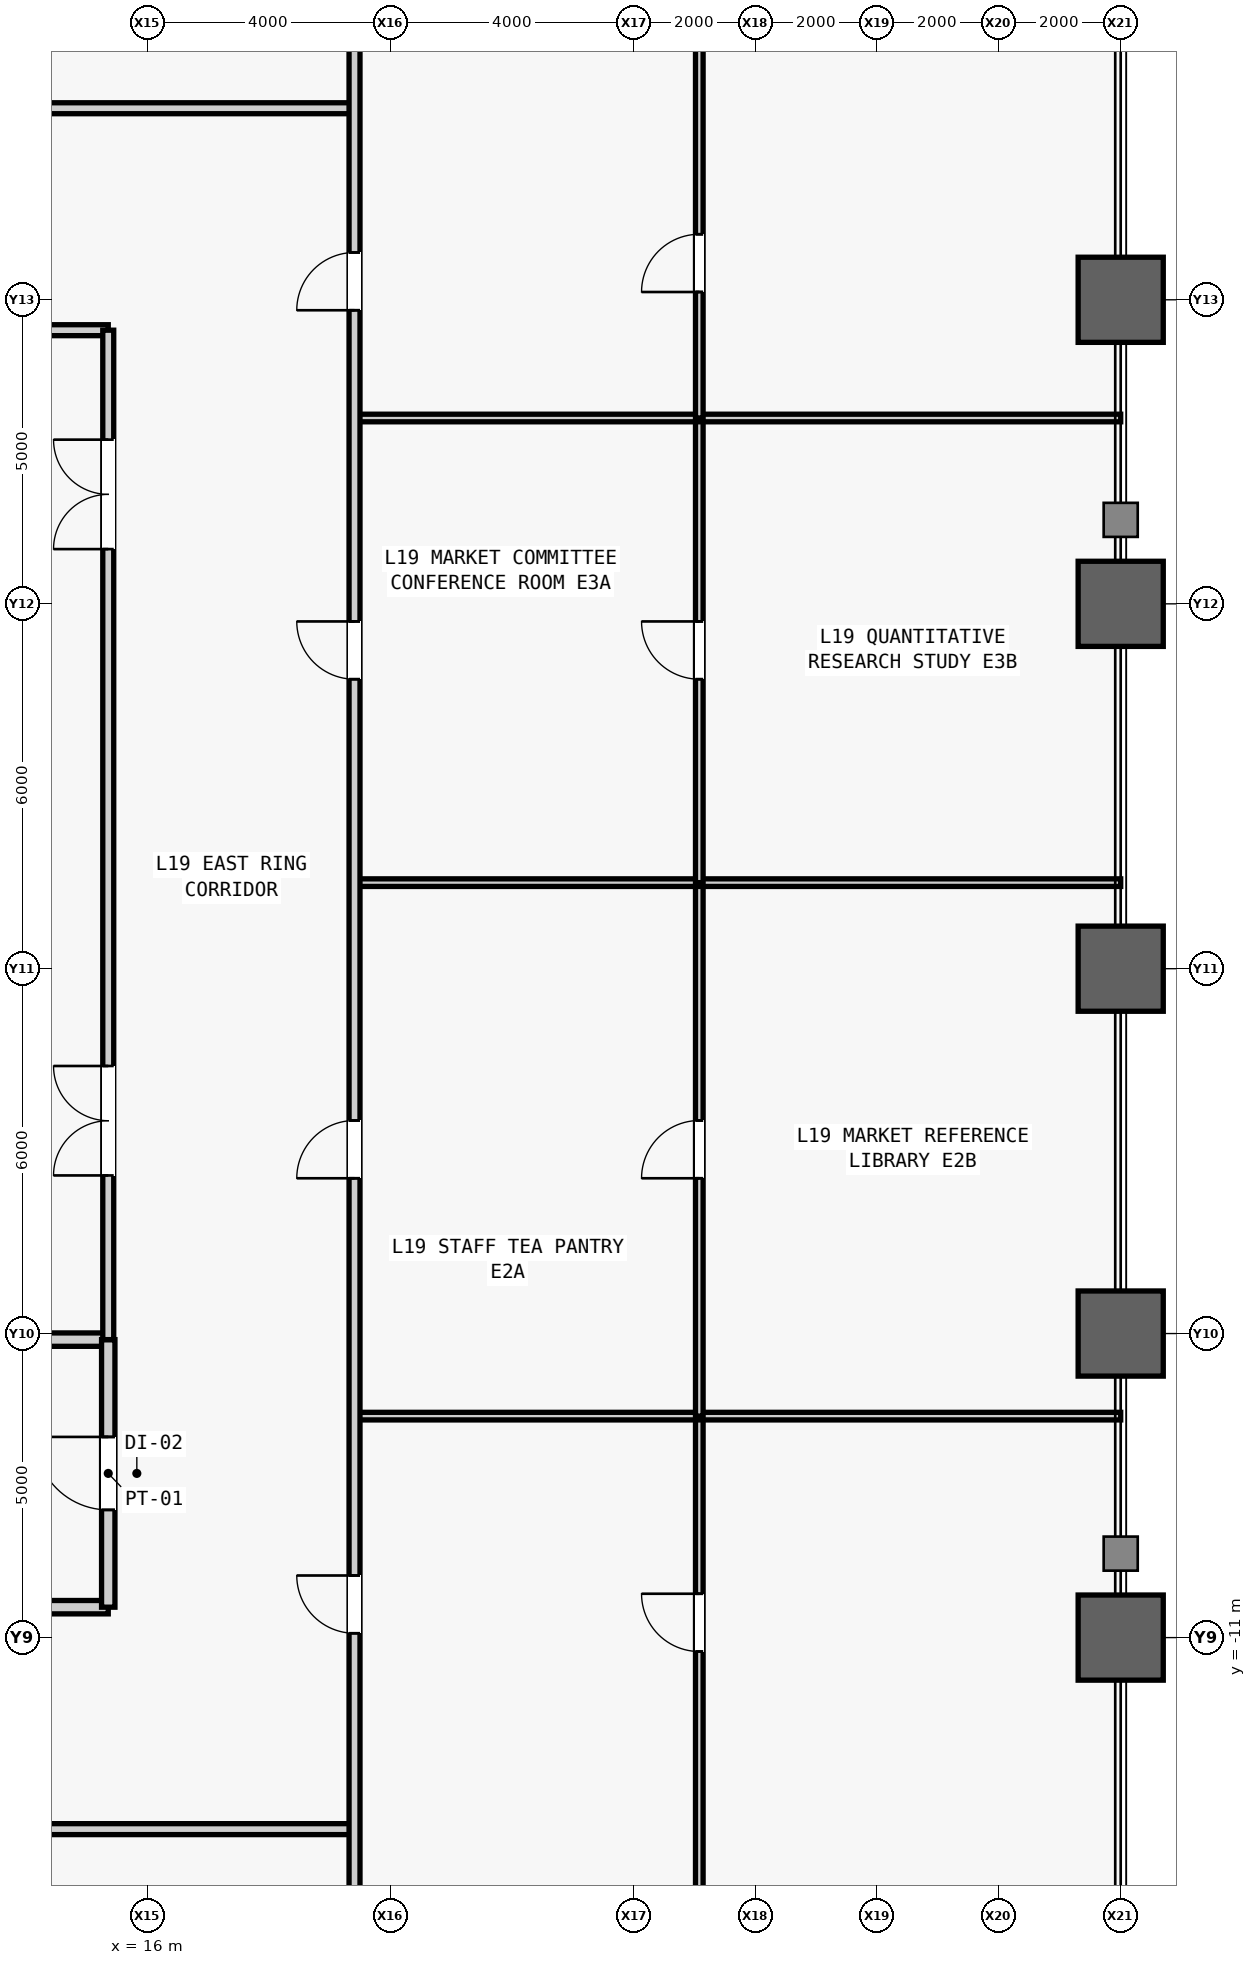
"""IFC4 building model, lengths in metres.
Left out: names, types, materials, properties, quantities, classifications, styles, units other than length and angle.
Written with IfcOpenShell. Run it as: python <this file> out.ifc"""

import sys

from ifc_helpers import new_model, si_unit, direction, frame, frame_2d, origin, origin_2d, place, context, subcontext, project, spatial, rectangle, hollow_rectangle, extrude, source, transform, mapped, element, fill, save


model = new_model("IFC4")
c1 = context("Model", 3, precision=1e-05, world=origin(), true_north=direction((0.0, 1.0)))
c2 = subcontext(c1, "Body", "Model", "MODEL_VIEW")
j1 = project(units=[si_unit("LENGTHUNIT", "METRE"), si_unit("PLANEANGLEUNIT", "RADIAN")], contexts=[c1])
p1 = place(None, origin())
s1 = spatial("IfcSite", under=j1, at=p1, CompositionType="ELEMENT")
p2 = place(p1, origin())
s2 = spatial("IfcBuilding", under=s1, at=p2, CompositionType="ELEMENT")
p3 = place(p2, frame((0.0, 0.0, 87.2)))
s3 = spatial("IfcBuildingStorey", under=s2, at=p3, CompositionType="ELEMENT", Elevation=87.2)
m1 = source(origin(), c2, "Body", "SweptSolid", [
    extrude(hollow_rectangle(XDim=1.4, YDim=1.4, WallThickness=0.075, at=origin_2d()), origin(), (0.0, 0.0, 1.0), 4.2),
])
for number, where, z_axis, x_axis in (
    (1, (32.0, -11.0, 0.0), (0.0, 0.0, 1.0), (1.0, 0.0, 0.0)),
    (2, (32.0, -6.0, 0.0), (0.0, 0.0, 1.0), (1.0, 0.0, 0.0)),
    (3, (32.0, 0.0, 0.0), (0.0, 0.0, 1.0), (1.0, 0.0, 0.0)),
    (4, (32.0, 6.0, 0.0), (0.0, 0.0, 1.0), (1.0, 0.0, 0.0)),
    (5, (32.0, 11.0, 0.0), (0.0, 0.0, 1.0), (1.0, 0.0, 0.0)),
):
    element("IfcColumn", number, at=place(p3, frame(where, z_axis=z_axis, x_axis=x_axis)), inside=s3, PredefinedType="COLUMN", context=c2, shape_type="MappedRepresentation", body=[
        mapped(m1, transform((0.0, 0.0, 0.0), scale=1.0)),
    ])
m2 = source(origin(), c2, "Body", "SweptSolid", [
    extrude(rectangle(XDim=4.05, YDim=0.22, at=frame_2d((2.025, 0.0))), origin(), (0.0, 0.0, 1.0), 3.94),
])
p4 = place(p3, frame((11.3, -10.5, 0.0), z_axis=(0.0, 0.0, 1.0), x_axis=(1.0, 0.0, 0.0)))
e6 = element("IfcWall", 6, at=p4, inside=s3, PredefinedType="PARTITIONING", context=c2, shape_type="MappedRepresentation", body=[
    mapped(m2, transform((0.0, 0.0, 0.0), scale=1.0)),
])
m3 = source(origin(), c2, "Body", "SweptSolid", [
    extrude(rectangle(XDim=4.05, YDim=0.22, at=frame_2d((2.025, 0.0))), origin(), (0.0, 0.0, 1.0), 2.54),
])
p5 = place(p3, frame((11.3, -6.1, 0.0), z_axis=(0.0, 0.0, 1.0), x_axis=(1.0, 0.0, 0.0)))
e7 = element("IfcWall", 7, at=p5, inside=s3, PredefinedType="PARTITIONING", context=c2, shape_type="MappedRepresentation", body=[
    mapped(m3, transform((0.0, 0.0, 0.0), scale=1.0)),
])
m4 = source(origin(), c2, "Body", "SweptSolid", [
    extrude(rectangle(XDim=4.4, YDim=0.22, at=frame_2d((2.2, 0.0))), origin(), (0.0, 0.0, 1.0), 3.94),
])
p6 = place(p3, frame((15.35, -10.5, 0.0), z_axis=(0.0, 0.0, 1.0), x_axis=(0.0, 1.0, 0.0)))
e8 = element("IfcWall", 8, at=p6, inside=s3, PredefinedType="PARTITIONING", context=c2, shape_type="MappedRepresentation", body=[
    mapped(m4, transform((0.0, 0.0, 0.0), scale=1.0)),
])
m5 = source(origin(), c2, "Body", "SweptSolid", [
    extrude(rectangle(XDim=1.2, YDim=2.2, at=frame_2d((0.6, 1.1))), frame((0.0, 0.12, 0.0), z_axis=(0.0, -1.0, 0.0), x_axis=(1.0, 0.0, 0.0)), (0.0, 0.0, 1.0), 0.24),
])
p7 = place(p6, frame((1.6, 0.0, 0.0)))
e9 = element("IfcOpeningElement", 9, at=p7, cuts=e8, PredefinedType="OPENING", context=c2, shape_type="MappedRepresentation", body=[
    mapped(m5, transform((0.0, 0.0, 0.0), scale=1.0)),
])
m6 = source(origin(), c2, "Body", "SweptSolid", [
    extrude(rectangle(XDim=4.05, YDim=0.18, at=frame_2d((2.025, 0.0))), origin(), (0.0, 0.0, 1.0), 3.94),
])
p8 = place(p3, frame((11.3, 10.5, 0.0), z_axis=(0.0, 0.0, 1.0), x_axis=(1.0, 0.0, 0.0)))
e10 = element("IfcWall", 10, at=p8, inside=s3, PredefinedType="PARTITIONING", context=c2, shape_type="MappedRepresentation", body=[
    mapped(m6, transform((0.0, 0.0, 0.0), scale=1.0)),
])
m7 = source(origin(), c2, "Body", "SweptSolid", [
    extrude(rectangle(XDim=16.6, YDim=0.18, at=frame_2d((8.3, 0.0))), origin(), (0.0, 0.0, 1.0), 3.94),
])
p9 = place(p3, frame((15.35, -6.1, 0.0), z_axis=(0.0, 0.0, 1.0), x_axis=(0.0, 1.0, 0.0)))
e11 = element("IfcWall", 11, at=p9, inside=s3, PredefinedType="PARTITIONING", context=c2, shape_type="MappedRepresentation", body=[
    mapped(m7, transform((0.0, 0.0, 0.0), scale=1.0)),
])
m8 = source(origin(), c2, "Body", "SweptSolid", [
    extrude(rectangle(XDim=1.8, YDim=2.25, at=frame_2d((0.9, 1.125))), frame((0.0, 0.1, 0.0), z_axis=(0.0, -1.0, 0.0), x_axis=(1.0, 0.0, 0.0)), (0.0, 0.0, 1.0), 0.2),
])
p10 = place(p9, frame((2.7, 0.0, 0.0)))
e12 = element("IfcOpeningElement", 12, at=p10, cuts=e11, PredefinedType="OPENING", context=c2, shape_type="MappedRepresentation", body=[
    mapped(m8, transform((0.0, 0.0, 0.0), scale=1.0)),
])
p11 = place(p9, frame((13.0, 0.0, 0.0)))
e13 = element("IfcOpeningElement", 13, at=p11, cuts=e11, PredefinedType="OPENING", context=c2, shape_type="MappedRepresentation", body=[
    mapped(m8, transform((0.0, 0.0, 0.0), scale=1.0)),
])
m9 = source(origin(), c2, "Body", "SweptSolid", [
    extrude(rectangle(XDim=37.95, YDim=0.18, at=frame_2d((18.975, 0.0))), origin(), (0.0, 0.0, 1.0), 3.94),
])
p12 = place(p3, frame((-18.55, -14.15, 0.0), z_axis=(0.0, 0.0, 1.0), x_axis=(1.0, 0.0, 0.0)))
e14 = element("IfcWall", 14, at=p12, inside=s3, PredefinedType="PARTITIONING", context=c2, shape_type="MappedRepresentation", body=[
    mapped(m9, transform((0.0, 0.0, 0.0), scale=1.0)),
])
m10 = source(origin(), c2, "Body", "SweptSolid", [
    extrude(rectangle(XDim=1.05, YDim=2.2, at=frame_2d((0.525, 1.1))), frame((0.0, 0.1, 0.0), z_axis=(0.0, -1.0, 0.0), x_axis=(1.0, 0.0, 0.0)), (0.0, 0.0, 1.0), 0.2),
])
p13 = place(p12, frame((4.966, 0.0, 0.0)))
e15 = element("IfcOpeningElement", 15, at=p13, cuts=e14, PredefinedType="OPENING", context=c2, shape_type="MappedRepresentation", body=[
    mapped(m10, transform((0.0, 0.0, 0.0), scale=1.0)),
])
p14 = place(p12, frame((10.291, 0.0, 0.0)))
e16 = element("IfcOpeningElement", 16, at=p14, cuts=e14, PredefinedType="OPENING", context=c2, shape_type="MappedRepresentation", body=[
    mapped(m10, transform((0.0, 0.0, 0.0), scale=1.0)),
])
p15 = place(p12, frame((18.64, 0.0, 0.0)))
e17 = element("IfcOpeningElement", 17, at=p15, cuts=e14, PredefinedType="OPENING", context=c2, shape_type="MappedRepresentation", body=[
    mapped(m10, transform((0.0, 0.0, 0.0), scale=1.0)),
])
p16 = place(p12, frame((27.178, 0.0, 0.0)))
e18 = element("IfcOpeningElement", 18, at=p16, cuts=e14, PredefinedType="OPENING", context=c2, shape_type="MappedRepresentation", body=[
    mapped(m10, transform((0.0, 0.0, 0.0), scale=1.0)),
])
p17 = place(p3, frame((-18.55, 14.15, 0.0), z_axis=(0.0, 0.0, 1.0), x_axis=(1.0, 0.0, 0.0)))
e19 = element("IfcWall", 19, at=p17, inside=s3, PredefinedType="PARTITIONING", context=c2, shape_type="MappedRepresentation", body=[
    mapped(m9, transform((0.0, 0.0, 0.0), scale=1.0)),
])
p18 = place(p17, frame((7.242, 0.0, 0.0)))
e20 = element("IfcOpeningElement", 20, at=p18, cuts=e19, PredefinedType="OPENING", context=c2, shape_type="MappedRepresentation", body=[
    mapped(m10, transform((0.0, 0.0, 0.0), scale=1.0)),
])
p19 = place(p17, frame((17.691, 0.0, 0.0)))
e21 = element("IfcOpeningElement", 21, at=p19, cuts=e19, PredefinedType="OPENING", context=c2, shape_type="MappedRepresentation", body=[
    mapped(m10, transform((0.0, 0.0, 0.0), scale=1.0)),
])
p20 = place(p17, frame((28.473, 0.0, 0.0)))
e22 = element("IfcOpeningElement", 22, at=p20, cuts=e19, PredefinedType="OPENING", context=c2, shape_type="MappedRepresentation", body=[
    mapped(m10, transform((0.0, 0.0, 0.0), scale=1.0)),
])
m11 = source(origin(), c2, "Body", "SweptSolid", [
    extrude(rectangle(XDim=21.142, YDim=0.125, at=frame_2d((10.571, 0.0))), origin(), (0.0, 0.0, 1.0), 3.94),
])
p21 = place(p3, frame((25.07, -28.5, 0.0), z_axis=(0.0, 0.0, 1.0), x_axis=(0.0, 1.0, 0.0)))
e23 = element("IfcWall", 23, at=p21, inside=s3, PredefinedType="PARTITIONING", context=c2, shape_type="MappedRepresentation", body=[
    mapped(m11, transform((0.0, 0.0, 0.0), scale=1.0)),
])
m12 = source(origin(), c2, "Body", "SweptSolid", [
    extrude(rectangle(XDim=0.95, YDim=2.15, at=frame_2d((0.475, 1.075))), frame((0.0, 0.073, 0.0), z_axis=(0.0, -1.0, 0.0), x_axis=(1.0, 0.0, 0.0)), (0.0, 0.0, 1.0), 0.145),
])
p22 = place(p21, frame((17.271, 0.0, 0.0)))
e24 = element("IfcOpeningElement", 24, at=p22, cuts=e23, PredefinedType="OPENING", context=c2, shape_type="MappedRepresentation", body=[
    mapped(m12, transform((0.0, 0.0, 0.0), scale=1.0)),
])
m13 = source(origin(), c2, "Body", "SweptSolid", [
    extrude(rectangle(XDim=12.6, YDim=0.125, at=frame_2d((6.3, 0.0))), origin(), (0.0, 0.0, 1.0), 3.94),
])
p23 = place(p3, frame((19.4, -7.358, 0.0), z_axis=(0.0, 0.0, 1.0), x_axis=(1.0, 0.0, 0.0)))
e25 = element("IfcWall", 25, at=p23, inside=s3, PredefinedType="PARTITIONING", context=c2, shape_type="MappedRepresentation", body=[
    mapped(m13, transform((0.0, 0.0, 0.0), scale=1.0)),
])
m14 = source(origin(), c2, "Body", "SweptSolid", [
    extrude(rectangle(XDim=8.773, YDim=0.125, at=frame_2d((4.386, 0.0))), origin(), (0.0, 0.0, 1.0), 3.94),
])
p24 = place(p3, frame((25.07, -7.358, 0.0), z_axis=(0.0, 0.0, 1.0), x_axis=(0.0, 1.0, 0.0)))
e26 = element("IfcWall", 26, at=p24, inside=s3, PredefinedType="PARTITIONING", context=c2, shape_type="MappedRepresentation", body=[
    mapped(m14, transform((0.0, 0.0, 0.0), scale=1.0)),
])
p25 = place(p24, frame((3.912, 0.0, 0.0)))
e27 = element("IfcOpeningElement", 27, at=p25, cuts=e26, PredefinedType="OPENING", context=c2, shape_type="MappedRepresentation", body=[
    mapped(m12, transform((0.0, 0.0, 0.0), scale=1.0)),
])
p26 = place(p3, frame((19.4, 1.415, 0.0), z_axis=(0.0, 0.0, 1.0), x_axis=(1.0, 0.0, 0.0)))
e28 = element("IfcWall", 28, at=p26, inside=s3, PredefinedType="PARTITIONING", context=c2, shape_type="MappedRepresentation", body=[
    mapped(m13, transform((0.0, 0.0, 0.0), scale=1.0)),
])
m15 = source(origin(), c2, "Body", "SweptSolid", [
    extrude(rectangle(XDim=7.641, YDim=0.125, at=frame_2d((3.82, 0.0))), origin(), (0.0, 0.0, 1.0), 3.94),
])
p27 = place(p3, frame((25.07, 1.415, 0.0), z_axis=(0.0, 0.0, 1.0), x_axis=(0.0, 1.0, 0.0)))
e29 = element("IfcWall", 29, at=p27, inside=s3, PredefinedType="PARTITIONING", context=c2, shape_type="MappedRepresentation", body=[
    mapped(m15, transform((0.0, 0.0, 0.0), scale=1.0)),
])
p28 = place(p27, frame((3.345, 0.0, 0.0)))
e30 = element("IfcOpeningElement", 30, at=p28, cuts=e29, PredefinedType="OPENING", context=c2, shape_type="MappedRepresentation", body=[
    mapped(m12, transform((0.0, 0.0, 0.0), scale=1.0)),
])
p29 = place(p3, frame((19.4, 9.056, 0.0), z_axis=(0.0, 0.0, 1.0), x_axis=(1.0, 0.0, 0.0)))
e31 = element("IfcWall", 31, at=p29, inside=s3, PredefinedType="PARTITIONING", context=c2, shape_type="MappedRepresentation", body=[
    mapped(m13, transform((0.0, 0.0, 0.0), scale=1.0)),
])
m16 = source(origin(), c2, "Body", "SweptSolid", [
    extrude(rectangle(XDim=19.444, YDim=0.125, at=frame_2d((9.722, 0.0))), origin(), (0.0, 0.0, 1.0), 3.94),
])
p30 = place(p3, frame((25.07, 9.056, 0.0), z_axis=(0.0, 0.0, 1.0), x_axis=(0.0, 1.0, 0.0)))
e32 = element("IfcWall", 32, at=p30, inside=s3, PredefinedType="PARTITIONING", context=c2, shape_type="MappedRepresentation", body=[
    mapped(m16, transform((0.0, 0.0, 0.0), scale=1.0)),
])
p31 = place(p30, frame((2.072, 0.0, 0.0)))
e33 = element("IfcOpeningElement", 33, at=p31, cuts=e32, PredefinedType="OPENING", context=c2, shape_type="MappedRepresentation", body=[
    mapped(m12, transform((0.0, 0.0, 0.0), scale=1.0)),
])
m17 = source(origin(), c2, "Body", "SweptSolid", [
    extrude(rectangle(XDim=57.0, YDim=0.18, at=frame_2d((28.5, 0.0))), origin(), (0.0, 0.0, 1.0), 3.471),
])
p32 = place(p3, frame((19.4, -28.5, 0.0), z_axis=(0.0, 0.0, 1.0), x_axis=(0.0, 1.0, 0.0)))
e34 = element("IfcWall", 34, at=p32, inside=s3, PredefinedType="PARTITIONING", context=c2, shape_type="MappedRepresentation", body=[
    mapped(m17, transform((0.0, 0.0, 0.0), scale=1.0)),
])
m18 = source(origin(), c2, "Body", "SweptSolid", [
    extrude(rectangle(XDim=0.95, YDim=2.15, at=frame_2d((0.475, 1.075))), frame((0.0, 0.1, 0.0), z_axis=(0.0, -1.0, 0.0), x_axis=(1.0, 0.0, 0.0)), (0.0, 0.0, 1.0), 0.2),
])
p33 = place(p32, frame((17.571, 0.0, 0.0)))
e35 = element("IfcOpeningElement", 35, at=p33, cuts=e34, PredefinedType="OPENING", context=c2, shape_type="MappedRepresentation", body=[
    mapped(m18, transform((0.0, 0.0, 0.0), scale=1.0)),
])
p34 = place(p32, frame((25.053, 0.0, 0.0)))
e36 = element("IfcOpeningElement", 36, at=p34, cuts=e34, PredefinedType="OPENING", context=c2, shape_type="MappedRepresentation", body=[
    mapped(m18, transform((0.0, 0.0, 0.0), scale=1.0)),
])
p35 = place(p32, frame((33.26, 0.0, 0.0)))
e37 = element("IfcOpeningElement", 37, at=p35, cuts=e34, PredefinedType="OPENING", context=c2, shape_type="MappedRepresentation", body=[
    mapped(m18, transform((0.0, 0.0, 0.0), scale=1.0)),
])
p36 = place(p32, frame((39.328, 0.0, 0.0)))
e38 = element("IfcOpeningElement", 38, at=p36, cuts=e34, PredefinedType="OPENING", context=c2, shape_type="MappedRepresentation", body=[
    mapped(m18, transform((0.0, 0.0, 0.0), scale=1.0)),
])
m19 = source(origin(), c2, "Body", "SweptSolid", [
    extrude(rectangle(XDim=1.2, YDim=2.2, at=frame_2d((0.6, 1.1))), frame((0.0, 0.025, 0.0), z_axis=(0.0, -1.0, 0.0), x_axis=(1.0, 0.0, 0.0)), (0.0, 0.0, 1.0), 0.05),
])
p37 = place(p7, origin())
e39 = element("IfcDoor", 39, at=p37, inside=s3, OperationType="SINGLE_SWING_RIGHT", PredefinedType="DOOR", context=c2, shape_type="MappedRepresentation", body=[
    mapped(m19, transform((0.0, 0.0, 0.0), scale=1.0)),
])
fill(e9, e39)
m20 = source(origin(), c2, "Body", "SweptSolid", [
    extrude(rectangle(XDim=1.8, YDim=2.25, at=frame_2d((0.9, 1.125))), frame((0.0, 0.025, 0.0), z_axis=(0.0, -1.0, 0.0), x_axis=(1.0, 0.0, 0.0)), (0.0, 0.0, 1.0), 0.05),
])
p38 = place(p10, origin())
e40 = element("IfcDoor", 40, at=p38, inside=s3, OperationType="SINGLE_SWING_RIGHT", PredefinedType="DOOR", context=c2, shape_type="MappedRepresentation", body=[
    mapped(m20, transform((0.0, 0.0, 0.0), scale=1.0)),
])
fill(e12, e40)
p39 = place(p11, origin())
e41 = element("IfcDoor", 41, at=p39, inside=s3, OperationType="SINGLE_SWING_LEFT", PredefinedType="DOOR", context=c2, shape_type="MappedRepresentation", body=[
    mapped(m20, transform((0.0, 0.0, 0.0), scale=1.0)),
])
fill(e13, e41)
m21 = source(origin(), c2, "Body", "SweptSolid", [
    extrude(rectangle(XDim=0.95, YDim=2.15, at=frame_2d((0.475, 1.075))), frame((0.0, 0.025, 0.0), z_axis=(0.0, -1.0, 0.0), x_axis=(1.0, 0.0, 0.0)), (0.0, 0.0, 1.0), 0.05),
])
p40 = place(p22, origin())
e42 = element("IfcDoor", 42, at=p40, inside=s3, OperationType="SINGLE_SWING_RIGHT", PredefinedType="DOOR", context=c2, shape_type="MappedRepresentation", body=[
    mapped(m21, transform((0.0, 0.0, 0.0), scale=1.0)),
])
fill(e24, e42)
p41 = place(p25, origin())
e43 = element("IfcDoor", 43, at=p41, inside=s3, OperationType="SINGLE_SWING_LEFT", PredefinedType="DOOR", context=c2, shape_type="MappedRepresentation", body=[
    mapped(m21, transform((0.0, 0.0, 0.0), scale=1.0)),
])
fill(e27, e43)
p42 = place(p28, origin())
e44 = element("IfcDoor", 44, at=p42, inside=s3, OperationType="SINGLE_SWING_RIGHT", PredefinedType="DOOR", context=c2, shape_type="MappedRepresentation", body=[
    mapped(m21, transform((0.0, 0.0, 0.0), scale=1.0)),
])
fill(e30, e44)
p43 = place(p31, origin())
e45 = element("IfcDoor", 45, at=p43, inside=s3, OperationType="SINGLE_SWING_LEFT", PredefinedType="DOOR", context=c2, shape_type="MappedRepresentation", body=[
    mapped(m21, transform((0.0, 0.0, 0.0), scale=1.0)),
])
fill(e33, e45)
p44 = place(p33, origin())
e46 = element("IfcDoor", 46, at=p44, inside=s3, OperationType="SINGLE_SWING_RIGHT", PredefinedType="DOOR", context=c2, shape_type="MappedRepresentation", body=[
    mapped(m21, transform((0.0, 0.0, 0.0), scale=1.0)),
])
fill(e35, e46)
p45 = place(p34, origin())
e47 = element("IfcDoor", 47, at=p45, inside=s3, OperationType="SINGLE_SWING_LEFT", PredefinedType="DOOR", context=c2, shape_type="MappedRepresentation", body=[
    mapped(m21, transform((0.0, 0.0, 0.0), scale=1.0)),
])
fill(e36, e47)
p46 = place(p35, origin())
e48 = element("IfcDoor", 48, at=p46, inside=s3, OperationType="SINGLE_SWING_RIGHT", PredefinedType="DOOR", context=c2, shape_type="MappedRepresentation", body=[
    mapped(m21, transform((0.0, 0.0, 0.0), scale=1.0)),
])
fill(e37, e48)
p47 = place(p36, origin())
e49 = element("IfcDoor", 49, at=p47, inside=s3, OperationType="SINGLE_SWING_LEFT", PredefinedType="DOOR", context=c2, shape_type="MappedRepresentation", body=[
    mapped(m21, transform((0.0, 0.0, 0.0), scale=1.0)),
])
fill(e38, e49)
save(model, sys.argv[1])
